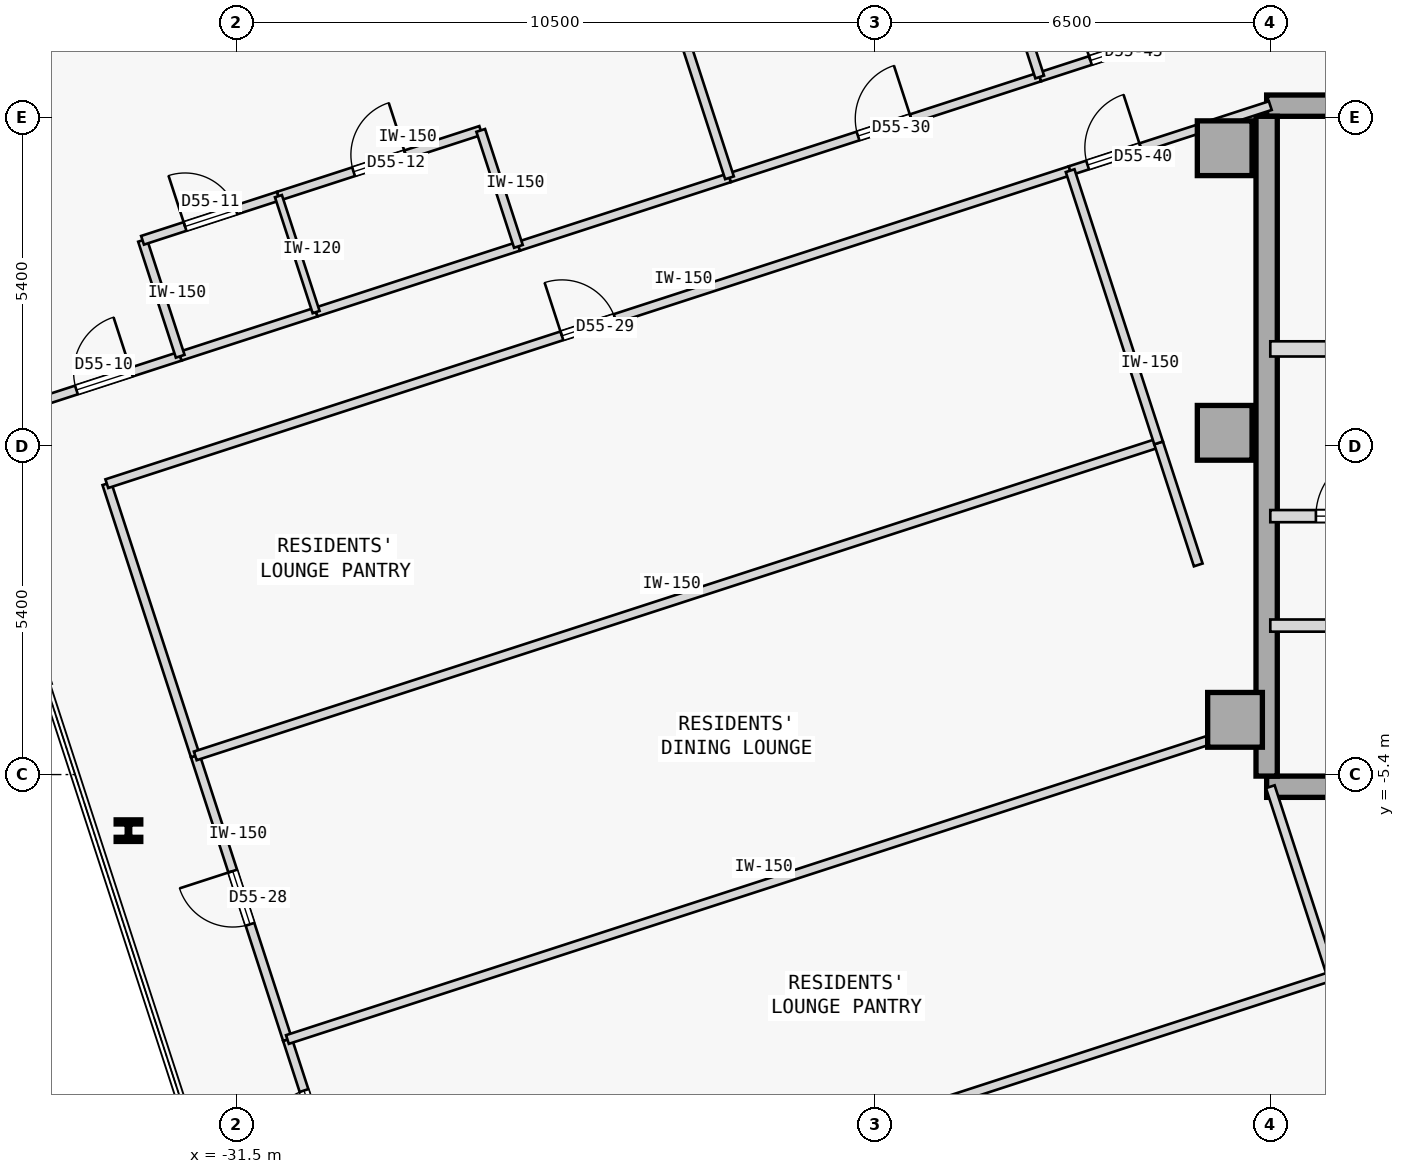
"""IFC4 building model, lengths in metres.
Left out: names, types, materials, properties, quantities, classifications, styles, units other than length and angle.
Written with IfcOpenShell. Run it as: python <this file> out.ifc"""

import sys

from ifc_helpers import new_model, si_unit, direction, frame, frame_2d, origin, origin_2d, place, context, subcontext, project, spatial, rectangle, i_section, extrude, element, fill, save


model = new_model("IFC4")
c1 = context("Model", 3, precision=1e-05, world=origin(), true_north=direction((0.0, 1.0)))
c2 = subcontext(c1, "Body", "Model", "MODEL_VIEW")
j1 = project(units=[si_unit("LENGTHUNIT", "METRE"), si_unit("PLANEANGLEUNIT", "RADIAN")], contexts=[c1])
p1 = place(None, origin())
s1 = spatial("IfcSite", under=j1, at=p1, CompositionType="ELEMENT")
p2 = place(p1, origin())
s2 = spatial("IfcBuilding", under=s1, at=p2, CompositionType="ELEMENT")
p3 = place(p2, frame((0.0, 0.0, 210.9)))
s3 = spatial("IfcBuildingStorey", under=s2, at=p3, CompositionType="ELEMENT", Elevation=210.9)
for number, where, z_axis, x_axis in (
    (1, (-15.25, 4.9, 0.0), (0.0, 0.0, 1.0), (1.0, 0.0, 0.0)),
    (2, (-15.25, 0.22, 0.0), (0.0, 0.0, 1.0), (1.0, 0.0, 0.0)),
    (3, (-15.08, -4.5, 0.0), (0.0, 0.0, 1.0), (1.0, 0.0, 0.0)),
):
    element("IfcColumn", number, at=place(p3, frame(where, z_axis=z_axis, x_axis=x_axis)), inside=s3, PredefinedType="COLUMN", context=c2, shape_type="SweptSolid", body=[
        extrude(rectangle(XDim=0.9, YDim=0.9, at=origin_2d()), origin(), (0.0, 0.0, 1.0), 3.35),
    ])
p4 = place(p3, frame((-14.56, 5.6, 0.0), z_axis=(0.0, 0.0, 1.0), x_axis=(1.0, 0.0, 0.0)))
e4 = element("IfcWall", 4, at=p4, inside=s3, PredefinedType="SHEAR", context=c2, shape_type="SweptSolid", body=[
    extrude(rectangle(XDim=11.41, YDim=0.35, at=frame_2d((5.705, 0.0))), origin(), (0.0, 0.0, 1.0), 3.125),
])
p5 = place(p3, frame((-14.56, -5.6, 0.0), z_axis=(0.0, 0.0, 1.0), x_axis=(1.0, 0.0, 0.0)))
e5 = element("IfcWall", 5, at=p5, inside=s3, PredefinedType="SHEAR", context=c2, shape_type="SweptSolid", body=[
    extrude(rectangle(XDim=10.86, YDim=0.35, at=frame_2d((5.43, 0.0))), origin(), (0.0, 0.0, 1.0), 3.125),
])
p6 = place(p3, frame((-14.56, -5.425, 0.0), z_axis=(0.0, 0.0, 1.0), x_axis=(0.0, 1.0, 0.0)))
e6 = element("IfcWall", 6, at=p6, inside=s3, PredefinedType="SHEAR", context=c2, shape_type="SweptSolid", body=[
    extrude(rectangle(XDim=10.85, YDim=0.35, at=frame_2d((5.425, 0.0))), origin(), (0.0, 0.0, 1.0), 3.125),
])
p7 = place(p3, frame((-33.278, -6.322, 0.0), z_axis=(0.0, 0.0, 1.0), x_axis=(1.0, 0.0, 0.0)))
e7 = element("IfcColumn", 7, at=p7, inside=s3, PredefinedType="COLUMN", context=c2, shape_type="SweptSolid", body=[
    extrude(i_section(OverallWidth=0.405, OverallDepth=0.355, WebThickness=0.042, FlangeThickness=0.068, FilletRadius=0.015, at=origin_2d()), origin(), (0.0, 0.0, 1.0), 3.35),
])
p8 = place(p3, frame((-14.5, 1.6, 0.0), z_axis=(0.0, 0.0, 1.0), x_axis=(1.0, 0.0, 0.0)))
e8 = element("IfcWall", 8, at=p8, inside=s3, PredefinedType="STANDARD", context=c2, shape_type="SweptSolid", body=[
    extrude(rectangle(XDim=3.6, YDim=0.25, at=frame_2d((1.8, 0.0))), origin(), (0.0, 0.0, 1.0), 3.125),
])
p9 = place(p8, frame((0.92, 0.0, 0.0)))
e9 = element("IfcOpeningElement", 9, at=p9, cuts=e8, PredefinedType="OPENING", context=c2, shape_type="SweptSolid", body=[
    extrude(rectangle(XDim=1.05, YDim=2.15, at=frame_2d((0.525, 1.075))), frame((0.0, 0.135, 0.0), z_axis=(0.0, -1.0, 0.0), x_axis=(1.0, 0.0, 0.0)), (0.0, 0.0, 1.0), 0.27),
])
p10 = place(p3, frame((-14.5, -1.15, 0.0), z_axis=(0.0, 0.0, 1.0), x_axis=(1.0, 0.0, 0.0)))
e10 = element("IfcWall", 10, at=p10, inside=s3, PredefinedType="STANDARD", context=c2, shape_type="SweptSolid", body=[
    extrude(rectangle(XDim=2.95, YDim=0.2, at=frame_2d((1.475, 0.0))), origin(), (0.0, 0.0, 1.0), 3.125),
])
p11 = place(p10, frame((0.75, 0.0, 0.0)))
e11 = element("IfcOpeningElement", 11, at=p11, cuts=e10, PredefinedType="OPENING", context=c2, shape_type="SweptSolid", body=[
    extrude(rectangle(XDim=1.05, YDim=2.18, at=frame_2d((0.525, 1.09))), frame((0.0, 0.11, 0.0), z_axis=(0.0, -1.0, 0.0), x_axis=(1.0, 0.0, 0.0)), (0.0, 0.0, 1.0), 0.22),
])
p12 = place(p3, frame((-14.5, -2.95, 0.0), z_axis=(0.0, 0.0, 1.0), x_axis=(1.0, 0.0, 0.0)))
e12 = element("IfcWall", 12, at=p12, inside=s3, PredefinedType="STANDARD", context=c2, shape_type="SweptSolid", body=[
    extrude(rectangle(XDim=10.8, YDim=0.2, at=frame_2d((5.4, 0.0))), origin(), (0.0, 0.0, 1.0), 3.125),
])
p13 = place(p12, frame((9.17, 0.0, 0.0)))
e13 = element("IfcOpeningElement", 13, at=p13, cuts=e12, PredefinedType="OPENING", context=c2, shape_type="SweptSolid", body=[
    extrude(rectangle(XDim=1.1, YDim=2.15, at=frame_2d((0.55, 1.075))), frame((0.0, 0.11, 0.0), z_axis=(0.0, -1.0, 0.0), x_axis=(1.0, 0.0, 0.0)), (0.0, 0.0, 1.0), 0.22),
])
p14 = place(p12, frame((3.86, 0.0, 0.0)))
e14 = element("IfcOpeningElement", 14, at=p14, cuts=e12, PredefinedType="OPENING", context=c2, shape_type="SweptSolid", body=[
    extrude(rectangle(XDim=0.92, YDim=2.15, at=frame_2d((0.46, 1.075))), frame((0.0, 0.11, 0.0), z_axis=(0.0, -1.0, 0.0), x_axis=(1.0, 0.0, 0.0)), (0.0, 0.0, 1.0), 0.22),
])
p15 = place(p3, frame((-36.012, 0.314, 0.0), z_axis=(0.0, 0.0, 1.0), x_axis=(0.951071182868, 0.308971851659, 0.0)))
e15 = element("IfcWall", 15, at=p15, inside=s3, PredefinedType="PARTITIONING", context=c2, shape_type="SweptSolid", body=[
    extrude(rectangle(XDim=3.77, YDim=0.15, at=frame_2d((1.885, 0.0))), origin(), (0.0, 0.0, 1.0), 3.125),
])
p16 = place(p15, frame((1.976, 0.0, 0.0)))
e16 = element("IfcOpeningElement", 16, at=p16, cuts=e15, PredefinedType="OPENING", context=c2, shape_type="SweptSolid", body=[
    extrude(rectangle(XDim=0.95, YDim=2.15, at=frame_2d((0.475, 1.075))), frame((0.0, 0.085, 0.0), z_axis=(0.0, -1.0, 0.0), x_axis=(1.0, 0.0, 0.0)), (0.0, 0.0, 1.0), 0.17),
])
p17 = place(p3, frame((-26.865, 3.286, 0.0), z_axis=(0.0, 0.0, 1.0), x_axis=(0.951057168147, 0.309014988174, 0.0)))
e17 = element("IfcWall", 17, at=p17, inside=s3, PredefinedType="PARTITIONING", context=c2, shape_type="SweptSolid", body=[
    extrude(rectangle(XDim=3.65, YDim=0.15, at=frame_2d((1.825, 0.0))), origin(), (0.0, 0.0, 1.0), 3.125),
])
p18 = place(p3, frame((-32.427, 1.479, 0.0), z_axis=(0.0, 0.0, 1.0), x_axis=(0.951045519245, 0.309050837767, 0.0)))
e18 = element("IfcWall", 18, at=p18, inside=s3, PredefinedType="PARTITIONING", context=c2, shape_type="SweptSolid", body=[
    extrude(rectangle(XDim=2.35, YDim=0.15, at=frame_2d((1.175, 0.0))), origin(), (0.0, 0.0, 1.0), 3.125),
])
p19 = place(p3, frame((-30.192, 2.205, 0.0), z_axis=(0.0, 0.0, 1.0), x_axis=(0.951063814176, 0.308994532905, 0.0)))
e19 = element("IfcWall", 19, at=p19, inside=s3, PredefinedType="PARTITIONING", context=c2, shape_type="SweptSolid", body=[
    extrude(rectangle(XDim=3.498, YDim=0.15, at=frame_2d((1.749, 0.0))), origin(), (0.0, 0.0, 1.0), 3.125),
])
p20 = place(p3, frame((-29.833, -12.311, 0.0), z_axis=(0.0, 0.0, 1.0), x_axis=(-0.309044953986, 0.951047431213, 0.0)))
e20 = element("IfcWall", 20, at=p20, inside=s3, PredefinedType="PARTITIONING", context=c2, shape_type="SweptSolid", body=[
    extrude(rectangle(XDim=2.685, YDim=0.15, at=frame_2d((1.343, 0.0))), origin(), (0.0, 0.0, 1.0), 3.125),
])
p21 = place(p20, frame((0.883, 0.0, 0.0)))
e21 = element("IfcOpeningElement", 21, at=p21, cuts=e20, PredefinedType="OPENING", context=c2, shape_type="SweptSolid", body=[
    extrude(rectangle(XDim=0.92, YDim=2.15, at=frame_2d((0.46, 1.075))), frame((0.0, 0.085, 0.0), z_axis=(0.0, -1.0, 0.0), x_axis=(1.0, 0.0, 0.0)), (0.0, 0.0, 1.0), 0.17),
])
p22 = place(p3, frame((-30.663, -9.757, 0.0), z_axis=(0.0, 0.0, 1.0), x_axis=(-0.309019653166, 0.951055652397, 0.0)))
e22 = element("IfcWall", 22, at=p22, inside=s3, PredefinedType="PARTITIONING", context=c2, shape_type="SweptSolid", body=[
    extrude(rectangle(XDim=4.904, YDim=0.15, at=frame_2d((2.452, 0.0))), origin(), (0.0, 0.0, 1.0), 3.125),
])
p23 = place(p22, frame((1.992, 0.0, 0.0)))
e23 = element("IfcOpeningElement", 23, at=p23, cuts=e22, PredefinedType="OPENING", context=c2, shape_type="SweptSolid", body=[
    extrude(rectangle(XDim=0.92, YDim=2.15, at=frame_2d((0.46, 1.075))), frame((0.0, 0.085, 0.0), z_axis=(0.0, -1.0, 0.0), x_axis=(1.0, 0.0, 0.0)), (0.0, 0.0, 1.0), 0.17),
])
p24 = place(p3, frame((-32.179, -5.093, 0.0), z_axis=(0.0, 0.0, 1.0), x_axis=(-0.309014532869, 0.951057316083, 0.0)))
e24 = element("IfcWall", 24, at=p24, inside=s3, PredefinedType="PARTITIONING", context=c2, shape_type="SweptSolid", body=[
    extrude(rectangle(XDim=4.707, YDim=0.15, at=frame_2d((2.354, 0.0))), origin(), (0.0, 0.0, 1.0), 3.125),
])
p25 = place(p3, frame((-33.633, -0.616, 0.0), z_axis=(0.0, 0.0, 1.0), x_axis=(0.951058192995, 0.309011833974, 0.0)))
e25 = element("IfcWall", 25, at=p25, inside=s3, PredefinedType="PARTITIONING", context=c2, shape_type="SweptSolid", body=[
    extrude(rectangle(XDim=16.657, YDim=0.15, at=frame_2d((8.329, 0.0))), origin(), (0.0, 0.0, 1.0), 3.125),
])
p26 = place(p25, frame((7.868, 0.0, 0.0)))
e26 = element("IfcOpeningElement", 26, at=p26, cuts=e25, PredefinedType="OPENING", context=c2, shape_type="SweptSolid", body=[
    extrude(rectangle(XDim=0.92, YDim=2.15, at=frame_2d((0.46, 1.075))), frame((0.0, 0.085, 0.0), z_axis=(0.0, -1.0, 0.0), x_axis=(1.0, 0.0, 0.0)), (0.0, 0.0, 1.0), 0.17),
])
p27 = place(p3, frame((-23.394, 4.414, 0.0), z_axis=(0.0, 0.0, 1.0), x_axis=(0.951050121956, 0.309036673434, 0.0)))
e27 = element("IfcWall", 27, at=p27, inside=s3, PredefinedType="PARTITIONING", context=c2, shape_type="SweptSolid", body=[
    extrude(rectangle(XDim=5.364, YDim=0.15, at=frame_2d((2.682, 0.0))), origin(), (0.0, 0.0, 1.0), 3.125),
])
p28 = place(p27, frame((2.222, 0.0, 0.0)))
e28 = element("IfcOpeningElement", 28, at=p28, cuts=e27, PredefinedType="OPENING", context=c2, shape_type="SweptSolid", body=[
    extrude(rectangle(XDim=0.92, YDim=2.15, at=frame_2d((0.46, 1.075))), frame((0.0, 0.085, 0.0), z_axis=(0.0, -1.0, 0.0), x_axis=(1.0, 0.0, 0.0)), (0.0, 0.0, 1.0), 0.17),
])
p29 = place(p3, frame((-17.792, 4.531, 0.0), z_axis=(0.0, 0.0, 1.0), x_axis=(0.951047546178, 0.309044600193, 0.0)))
e29 = element("IfcWall", 29, at=p29, inside=s3, PredefinedType="PARTITIONING", context=c2, shape_type="SweptSolid", body=[
    extrude(rectangle(XDim=3.461, YDim=0.15, at=frame_2d((1.73, 0.0))), origin(), (0.0, 0.0, 1.0), 3.125),
])
p30 = place(p29, frame((0.302, 0.0, 0.0)))
e30 = element("IfcOpeningElement", 30, at=p30, cuts=e29, PredefinedType="OPENING", context=c2, shape_type="SweptSolid", body=[
    extrude(rectangle(XDim=0.92, YDim=2.15, at=frame_2d((0.46, 1.075))), frame((0.0, 0.085, 0.0), z_axis=(0.0, -1.0, 0.0), x_axis=(1.0, 0.0, 0.0)), (0.0, 0.0, 1.0), 0.17),
])
p31 = place(p3, frame((-18.292, 6.072, 0.0), z_axis=(0.0, 0.0, 1.0), x_axis=(0.951062707515, 0.30899793911, 0.0)))
e31 = element("IfcWall", 31, at=p31, inside=s3, PredefinedType="PARTITIONING", context=c2, shape_type="SweptSolid", body=[
    extrude(rectangle(XDim=6.076, YDim=0.15, at=frame_2d((3.038, 0.0))), origin(), (0.0, 0.0, 1.0), 3.125),
])
p32 = place(p31, frame((0.877, 0.0, 0.0)))
e32 = element("IfcOpeningElement", 32, at=p32, cuts=e31, PredefinedType="OPENING", context=c2, shape_type="SweptSolid", body=[
    extrude(rectangle(XDim=0.92, YDim=2.15, at=frame_2d((0.46, 1.075))), frame((0.0, 0.085, 0.0), z_axis=(0.0, -1.0, 0.0), x_axis=(1.0, 0.0, 0.0)), (0.0, 0.0, 1.0), 0.17),
])
p33 = place(p3, frame((-32.427, 1.479, 0.0), z_axis=(0.0, 0.0, 1.0), x_axis=(-0.309022749039, 0.951054646472, 0.0)))
e33 = element("IfcWall", 33, at=p33, inside=s3, PredefinedType="PARTITIONING", context=c2, shape_type="SweptSolid", body=[
    extrude(rectangle(XDim=2.005, YDim=0.15, at=frame_2d((1.002, 0.0))), origin(), (0.0, 0.0, 1.0), 3.125),
])
p34 = place(p3, frame((-33.046, 3.386, 0.0), z_axis=(0.0, 0.0, 1.0), x_axis=(0.951045519245, 0.309050837767, 0.0)))
e34 = element("IfcWall", 34, at=p34, inside=s3, PredefinedType="PARTITIONING", context=c2, shape_type="SweptSolid", body=[
    extrude(rectangle(XDim=2.35, YDim=0.15, at=frame_2d((1.175, 0.0))), origin(), (0.0, 0.0, 1.0), 3.125),
])
p35 = place(p34, frame((0.735, 0.0, 0.0)))
e35 = element("IfcOpeningElement", 35, at=p35, cuts=e34, PredefinedType="OPENING", context=c2, shape_type="SweptSolid", body=[
    extrude(rectangle(XDim=0.88, YDim=2.15, at=frame_2d((0.44, 1.075))), frame((0.0, 0.085, 0.0), z_axis=(0.0, -1.0, 0.0), x_axis=(1.0, 0.0, 0.0)), (0.0, 0.0, 1.0), 0.17),
])
p36 = place(p3, frame((-30.811, 4.112, 0.0), z_axis=(0.0, 0.0, 1.0), x_axis=(0.951063814176, 0.308994532905, 0.0)))
e36 = element("IfcWall", 36, at=p36, inside=s3, PredefinedType="PARTITIONING", context=c2, shape_type="SweptSolid", body=[
    extrude(rectangle(XDim=3.498, YDim=0.15, at=frame_2d((1.749, 0.0))), origin(), (0.0, 0.0, 1.0), 3.125),
])
p37 = place(p36, frame((1.299, 0.0, 0.0)))
e37 = element("IfcOpeningElement", 37, at=p37, cuts=e36, PredefinedType="OPENING", context=c2, shape_type="SweptSolid", body=[
    extrude(rectangle(XDim=0.9, YDim=2.15, at=frame_2d((0.45, 1.075))), frame((0.0, 0.085, 0.0), z_axis=(0.0, -1.0, 0.0), x_axis=(1.0, 0.0, 0.0)), (0.0, 0.0, 1.0), 0.17),
])
p38 = place(p3, frame((-26.865, 3.286, 0.0), z_axis=(0.0, 0.0, 1.0), x_axis=(-0.309022749039, 0.951054646472, 0.0)))
e38 = element("IfcWall", 38, at=p38, inside=s3, PredefinedType="PARTITIONING", context=c2, shape_type="SweptSolid", body=[
    extrude(rectangle(XDim=2.005, YDim=0.15, at=frame_2d((1.002, 0.0))), origin(), (0.0, 0.0, 1.0), 3.125),
])
p39 = place(p3, frame((-23.394, 4.414, 0.0), z_axis=(0.0, 0.0, 1.0), x_axis=(-0.308976906612, 0.951069540665, 0.0)))
e39 = element("IfcWall", 39, at=p39, inside=s3, PredefinedType="PARTITIONING", context=c2, shape_type="SweptSolid", body=[
    extrude(rectangle(XDim=2.579, YDim=0.15, at=frame_2d((1.29, 0.0))), origin(), (0.0, 0.0, 1.0), 3.125),
])
p40 = place(p3, frame((-30.192, 2.205, 0.0), z_axis=(0.0, 0.0, 1.0), x_axis=(-0.309022749039, 0.951054646472, 0.0)))
e40 = element("IfcWall", 40, at=p40, inside=s3, PredefinedType="PARTITIONING", context=c2, shape_type="SweptSolid", body=[
    extrude(rectangle(XDim=2.005, YDim=0.12, at=frame_2d((1.002, 0.0))), origin(), (0.0, 0.0, 1.0), 3.125),
])
p41 = place(p3, frame((-31.208, -14.471, 0.0), z_axis=(0.0, 0.0, 1.0), x_axis=(0.951057753948, 0.309013185244, 0.0)))
e41 = element("IfcWall", 41, at=p41, inside=s3, PredefinedType="PARTITIONING", context=c2, shape_type="SweptSolid", body=[
    extrude(rectangle(XDim=18.632, YDim=0.15, at=frame_2d((9.316, 0.0))), origin(), (0.0, 0.0, 1.0), 3.125),
])
p42 = place(p3, frame((-30.663, -9.757, 0.0), z_axis=(0.0, 0.0, 1.0), x_axis=(0.951058192995, 0.309011833974, 0.0)))
e42 = element("IfcWall", 42, at=p42, inside=s3, PredefinedType="PARTITIONING", context=c2, shape_type="SweptSolid", body=[
    extrude(rectangle(XDim=16.657, YDim=0.15, at=frame_2d((8.329, 0.0))), origin(), (0.0, 0.0, 1.0), 3.125),
])
p43 = place(p3, frame((-13.488, -8.713, 0.0), z_axis=(0.0, 0.0, 1.0), x_axis=(-0.309082700143, 0.951035164687, 0.0)))
e43 = element("IfcWall", 43, at=p43, inside=s3, PredefinedType="PARTITIONING", context=c2, shape_type="SweptSolid", body=[
    extrude(rectangle(XDim=3.274, YDim=0.15, at=frame_2d((1.637, 0.0))), origin(), (0.0, 0.0, 1.0), 3.125),
])
p44 = place(p3, frame((-32.179, -5.093, 0.0), z_axis=(0.0, 0.0, 1.0), x_axis=(0.951053885426, 0.309025091239, 0.0)))
e44 = element("IfcWall", 44, at=p44, inside=s3, PredefinedType="PARTITIONING", context=c2, shape_type="SweptSolid", body=[
    extrude(rectangle(XDim=16.657, YDim=0.15, at=frame_2d((8.329, 0.0))), origin(), (0.0, 0.0, 1.0), 3.125),
])
p45 = place(p3, frame((-15.685, -1.952, 0.0), z_axis=(0.0, 0.0, 1.0), x_axis=(-0.308929092959, 0.951085072706, 0.0)))
e45 = element("IfcWall", 45, at=p45, inside=s3, PredefinedType="PARTITIONING", context=c2, shape_type="SweptSolid", body=[
    extrude(rectangle(XDim=2.11, YDim=0.15, at=frame_2d((1.055, 0.0))), origin(), (0.0, 0.0, 1.0), 3.125),
])
p46 = place(p3, frame((-16.337, 0.054, 0.0), z_axis=(0.0, 0.0, 1.0), x_axis=(-0.309029776355, 0.951052363083, 0.0)))
e46 = element("IfcWall", 46, at=p46, inside=s3, PredefinedType="PARTITIONING", context=c2, shape_type="SweptSolid", body=[
    extrude(rectangle(XDim=4.707, YDim=0.15, at=frame_2d((2.354, 0.0))), origin(), (0.0, 0.0, 1.0), 3.125),
])
p47 = place(p3, frame((-18.292, 6.072, 0.0), z_axis=(0.0, 0.0, 1.0), x_axis=(-0.309090353524, 0.951032677335, 0.0)))
e47 = element("IfcWall", 47, at=p47, inside=s3, PredefinedType="PARTITIONING", context=c2, shape_type="SweptSolid", body=[
    extrude(rectangle(XDim=2.579, YDim=0.15, at=frame_2d((1.29, 0.0))), origin(), (0.0, 0.0, 1.0), 3.125),
])
p48 = place(p11, origin())
e48 = element("IfcDoor", 48, at=p48, inside=s3, OperationType="SINGLE_SWING_RIGHT", PredefinedType="DOOR", context=c2, shape_type="SweptSolid", body=[
    extrude(rectangle(XDim=1.05, YDim=2.18, at=frame_2d((0.525, 1.09))), frame((0.0, 0.025, 0.0), z_axis=(0.0, -1.0, 0.0), x_axis=(1.0, 0.0, 0.0)), (0.0, 0.0, 1.0), 0.05),
])
fill(e11, e48)
p49 = place(p16, origin())
e49 = element("IfcDoor", 49, at=p49, inside=s3, OperationType="SINGLE_SWING_RIGHT", PredefinedType="DOOR", context=c2, shape_type="SweptSolid", body=[
    extrude(rectangle(XDim=0.95, YDim=2.15, at=frame_2d((0.475, 1.075))), frame((0.0, 0.025, 0.0), z_axis=(0.0, -1.0, 0.0), x_axis=(1.0, 0.0, 0.0)), (0.0, 0.0, 1.0), 0.05),
])
fill(e16, e49)
p50 = place(p35, origin())
e50 = element("IfcDoor", 50, at=p50, inside=s3, OperationType="SINGLE_SWING_LEFT", PredefinedType="DOOR", context=c2, shape_type="SweptSolid", body=[
    extrude(rectangle(XDim=0.88, YDim=2.15, at=frame_2d((0.44, 1.075))), frame((0.0, 0.025, 0.0), z_axis=(0.0, -1.0, 0.0), x_axis=(1.0, 0.0, 0.0)), (0.0, 0.0, 1.0), 0.05),
])
fill(e35, e50)
p51 = place(p37, origin())
e51 = element("IfcDoor", 51, at=p51, inside=s3, OperationType="SINGLE_SWING_RIGHT", PredefinedType="DOOR", context=c2, shape_type="SweptSolid", body=[
    extrude(rectangle(XDim=0.9, YDim=2.15, at=frame_2d((0.45, 1.075))), frame((0.0, 0.025, 0.0), z_axis=(0.0, -1.0, 0.0), x_axis=(1.0, 0.0, 0.0)), (0.0, 0.0, 1.0), 0.05),
])
fill(e37, e51)
p52 = place(p21, origin())
e52 = element("IfcDoor", 52, at=p52, inside=s3, OperationType="SINGLE_SWING_LEFT", PredefinedType="DOOR", context=c2, shape_type="SweptSolid", body=[
    extrude(rectangle(XDim=0.92, YDim=2.15, at=frame_2d((0.46, 1.075))), frame((0.0, 0.025, 0.0), z_axis=(0.0, -1.0, 0.0), x_axis=(1.0, 0.0, 0.0)), (0.0, 0.0, 1.0), 0.05),
])
fill(e21, e52)
p53 = place(p23, origin())
e53 = element("IfcDoor", 53, at=p53, inside=s3, OperationType="SINGLE_SWING_RIGHT", PredefinedType="DOOR", context=c2, shape_type="SweptSolid", body=[
    extrude(rectangle(XDim=0.92, YDim=2.15, at=frame_2d((0.46, 1.075))), frame((0.0, 0.025, 0.0), z_axis=(0.0, -1.0, 0.0), x_axis=(1.0, 0.0, 0.0)), (0.0, 0.0, 1.0), 0.05),
])
fill(e23, e53)
p54 = place(p26, origin())
e54 = element("IfcDoor", 54, at=p54, inside=s3, OperationType="SINGLE_SWING_LEFT", PredefinedType="DOOR", context=c2, shape_type="SweptSolid", body=[
    extrude(rectangle(XDim=0.92, YDim=2.15, at=frame_2d((0.46, 1.075))), frame((0.0, 0.025, 0.0), z_axis=(0.0, -1.0, 0.0), x_axis=(1.0, 0.0, 0.0)), (0.0, 0.0, 1.0), 0.05),
])
fill(e26, e54)
p55 = place(p28, origin())
e55 = element("IfcDoor", 55, at=p55, inside=s3, OperationType="SINGLE_SWING_RIGHT", PredefinedType="DOOR", context=c2, shape_type="SweptSolid", body=[
    extrude(rectangle(XDim=0.92, YDim=2.15, at=frame_2d((0.46, 1.075))), frame((0.0, 0.025, 0.0), z_axis=(0.0, -1.0, 0.0), x_axis=(1.0, 0.0, 0.0)), (0.0, 0.0, 1.0), 0.05),
])
fill(e28, e55)
p56 = place(p30, origin())
e56 = element("IfcDoor", 56, at=p56, inside=s3, OperationType="SINGLE_SWING_RIGHT", PredefinedType="DOOR", context=c2, shape_type="SweptSolid", body=[
    extrude(rectangle(XDim=0.92, YDim=2.15, at=frame_2d((0.46, 1.075))), frame((0.0, 0.025, 0.0), z_axis=(0.0, -1.0, 0.0), x_axis=(1.0, 0.0, 0.0)), (0.0, 0.0, 1.0), 0.05),
])
fill(e30, e56)
p57 = place(p32, origin())
e57 = element("IfcDoor", 57, at=p57, inside=s3, OperationType="SINGLE_SWING_LEFT", PredefinedType="DOOR", context=c2, shape_type="SweptSolid", body=[
    extrude(rectangle(XDim=0.92, YDim=2.15, at=frame_2d((0.46, 1.075))), frame((0.0, 0.025, 0.0), z_axis=(0.0, -1.0, 0.0), x_axis=(1.0, 0.0, 0.0)), (0.0, 0.0, 1.0), 0.05),
])
fill(e32, e57)
save(model, sys.argv[1])
